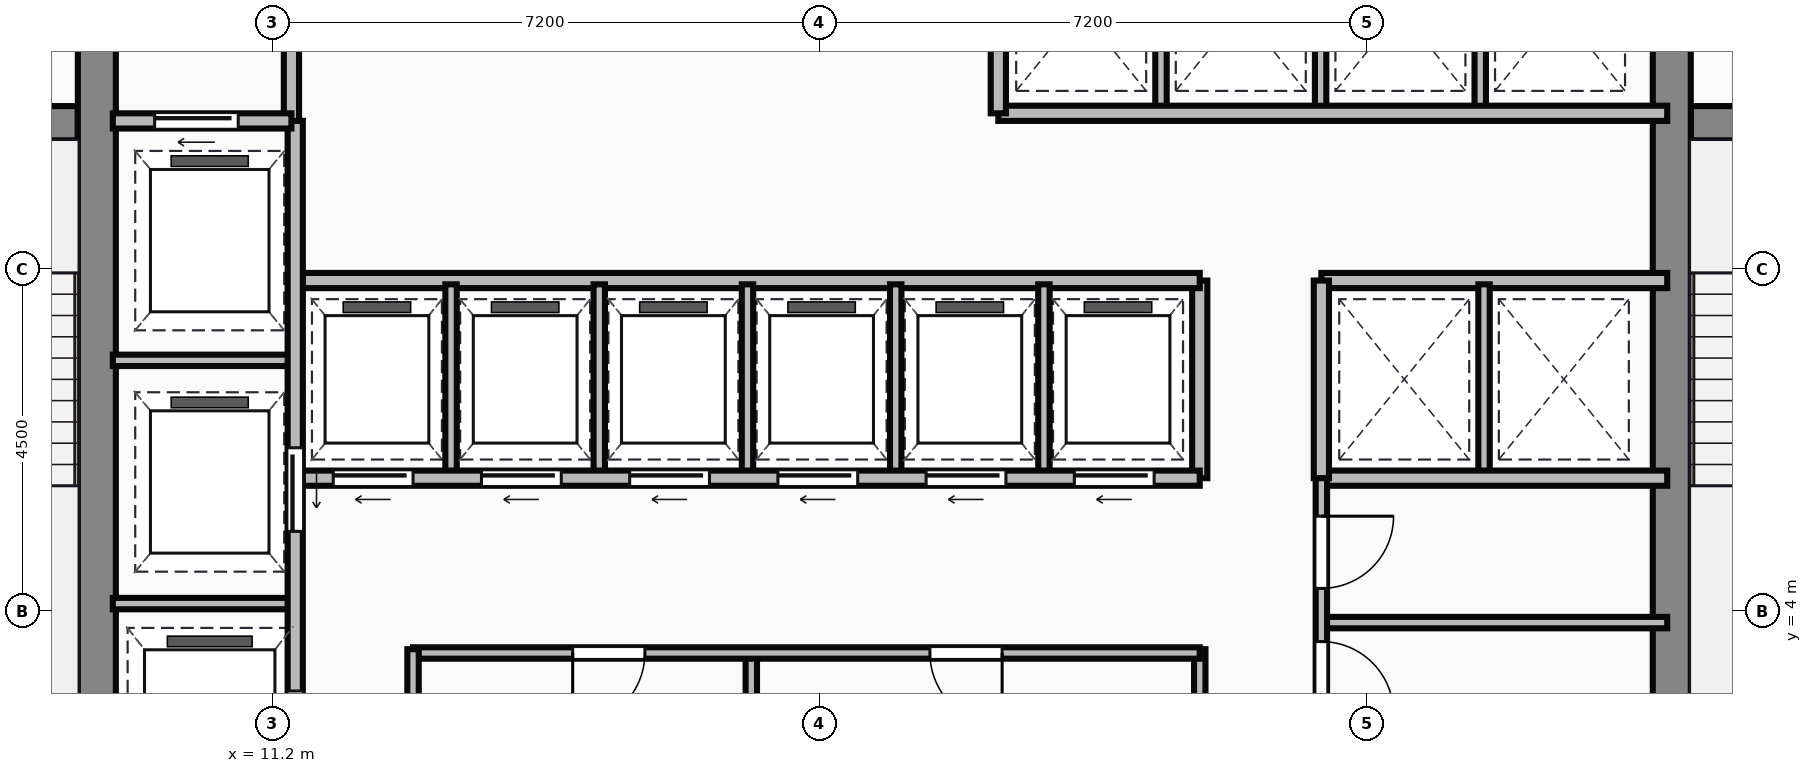
"""IFC4 building model, lengths in metres.
Left out: names, types, materials, properties, quantities, classifications, styles, units other than length and angle.
Written with IfcOpenShell. Run it as: python <this file> out.ifc"""

import sys

from ifc_helpers import new_model, si_unit, direction, frame, frame_2d, origin, place, context, subcontext, project, spatial, rectangle, extrude, source, transform, mapped, element, fill, save


model = new_model("IFC4")
c1 = context("Model", 3, precision=1e-05, world=origin(), true_north=direction((0.0, 1.0)))
c2 = subcontext(c1, "Body", "Model", "MODEL_VIEW")
j1 = project(units=[si_unit("LENGTHUNIT", "METRE"), si_unit("PLANEANGLEUNIT", "RADIAN")], contexts=[c1])
p1 = place(None, origin())
s1 = spatial("IfcSite", under=j1, at=p1, CompositionType="ELEMENT")
p2 = place(p1, origin())
s2 = spatial("IfcBuilding", under=s1, at=p2, CompositionType="ELEMENT")
p3 = place(p2, frame((0.0, 0.0, 144.25)))
s3 = spatial("IfcBuildingStorey", under=s2, at=p3, CompositionType="ELEMENT", Elevation=144.25)
m1 = source(origin(), c2, "Body", "SweptSolid", [
    extrude(rectangle(XDim=12.35, YDim=0.5, at=frame_2d((6.175, 0.0))), origin(), (0.0, 0.0, 1.0), 3.65),
])
for number, where, z_axis, x_axis in (
    (1, (8.89, 0.9, 0.0), (0.0, 0.0, 1.0), (0.0, 1.0, 0.0)),
    (2, (29.61, 0.9, 0.0), (0.0, 0.0, 1.0), (0.0, 1.0, 0.0)),
):
    element("IfcWall", number, at=place(p3, frame(where, z_axis=z_axis, x_axis=x_axis)), inside=s3, PredefinedType="SHEAR", context=c2, shape_type="MappedRepresentation", body=[
        mapped(m1, transform((0.0, 0.0, 0.0))),
    ])
m2 = source(origin(), c2, "Body", "SweptSolid", [
    extrude(rectangle(XDim=3.39, YDim=0.45, at=frame_2d((1.695, 0.0))), origin(), (0.0, 0.0, 1.0), 3.65),
])
p4 = place(p3, frame((5.25, 10.42, 0.0), z_axis=(0.0, 0.0, 1.0), x_axis=(1.0, 0.0, 0.0)))
e3 = element("IfcWall", 3, at=p4, inside=s3, PredefinedType="SHEAR", context=c2, shape_type="MappedRepresentation", body=[
    mapped(m2, transform((0.0, 0.0, 0.0))),
])
p5 = place(p4, frame((1.05, 0.0, 0.0)))
e4 = element("IfcOpeningElement", 4, at=p5, cuts=e3, PredefinedType="OPENING", context=c2, shape_type="SweptSolid", body=[
    extrude(rectangle(XDim=1.1, YDim=2.15, at=frame_2d((0.55, 1.075))), frame((0.0, 0.235, 0.0), z_axis=(0.0, -1.0, 0.0), x_axis=(1.0, 0.0, 0.0)), (0.0, 0.0, 1.0), 0.47),
])
p6 = place(p3, frame((29.86, 10.42, 0.0), z_axis=(0.0, 0.0, 1.0), x_axis=(1.0, 0.0, 0.0)))
e5 = element("IfcWall", 5, at=p6, inside=s3, PredefinedType="SHEAR", context=c2, shape_type="MappedRepresentation", body=[
    mapped(m2, transform((0.0, 0.0, 0.0))),
])
p7 = place(p6, frame((1.1, 0.0, 0.0)))
e6 = element("IfcOpeningElement", 6, at=p7, cuts=e5, PredefinedType="OPENING", context=c2, shape_type="SweptSolid", body=[
    extrude(rectangle(XDim=1.1, YDim=2.15, at=frame_2d((0.55, 1.075))), frame((0.0, 0.235, 0.0), z_axis=(0.0, -1.0, 0.0), x_axis=(1.0, 0.0, 0.0)), (0.0, 0.0, 1.0), 0.47),
])
m3 = source(origin(), c2, "Body", "SweptSolid", [
    extrude(rectangle(XDim=3.18, YDim=0.2, at=frame_2d((1.59, 0.0))), origin(), (0.0, 0.0, 1.0), 3.4),
])
p8 = place(p3, frame((11.45, 10.42, 0.0), z_axis=(0.0, 0.0, 1.0), x_axis=(0.0, 1.0, 0.0)))
e7 = element("IfcWall", 7, at=p8, inside=s3, PredefinedType="PARTITIONING", context=c2, shape_type="MappedRepresentation", body=[
    mapped(m3, transform((0.0, 0.0, 0.0))),
])
m4 = source(origin(), c2, "Body", "SweptSolid", [
    extrude(rectangle(XDim=2.35, YDim=0.2, at=frame_2d((1.175, 0.0))), origin(), (0.0, 0.0, 1.0), 3.4),
])
p9 = place(p3, frame((9.1, 10.45, 0.0), z_axis=(0.0, 0.0, 1.0), x_axis=(1.0, 0.0, 0.0)))
e8 = element("IfcWall", 8, at=p9, inside=s3, PredefinedType="PARTITIONING", context=c2, shape_type="MappedRepresentation", body=[
    mapped(m4, transform((0.0, 0.0, 0.0))),
])
p10 = place(p9, frame((0.55, 0.0, 0.0)))
e9 = element("IfcOpeningElement", 9, at=p10, cuts=e8, PredefinedType="OPENING", context=c2, shape_type="SweptSolid", body=[
    extrude(rectangle(XDim=1.1, YDim=2.15, at=frame_2d((0.55, 1.075))), frame((0.0, 0.11, 0.0), z_axis=(0.0, -1.0, 0.0), x_axis=(1.0, 0.0, 0.0)), (0.0, 0.0, 1.0), 0.22),
])
m5 = source(origin(), c2, "Body", "SweptSolid", [
    extrude(rectangle(XDim=9.6, YDim=0.2, at=frame_2d((4.8, 0.0))), origin(), (0.0, 0.0, 1.0), 3.4),
])
p11 = place(p3, frame((11.5, 0.85, 0.0), z_axis=(0.0, 0.0, 1.0), x_axis=(0.0, 1.0, 0.0)))
e10 = element("IfcWall", 10, at=p11, inside=s3, PredefinedType="PARTITIONING", context=c2, shape_type="MappedRepresentation", body=[
    mapped(m5, transform((0.0, 0.0, 0.0))),
])
p12 = place(p11, frame((4.2, 0.0, 0.0)))
e11 = element("IfcOpeningElement", 11, at=p12, cuts=e10, PredefinedType="OPENING", context=c2, shape_type="SweptSolid", body=[
    extrude(rectangle(XDim=1.1, YDim=2.15, at=frame_2d((0.55, 1.075))), frame((0.0, 0.11, 0.0), z_axis=(0.0, -1.0, 0.0), x_axis=(1.0, 0.0, 0.0)), (0.0, 0.0, 1.0), 0.22),
])
p13 = place(p11, frame((0.9, 0.0, 0.0)))
e12 = element("IfcOpeningElement", 12, at=p13, cuts=e10, PredefinedType="OPENING", context=c2, shape_type="SweptSolid", body=[
    extrude(rectangle(XDim=1.2, YDim=2.15, at=frame_2d((0.6, 1.075))), frame((0.0, 0.11, 0.0), z_axis=(0.0, -1.0, 0.0), x_axis=(1.0, 0.0, 0.0)), (0.0, 0.0, 1.0), 0.22),
])
m6 = source(origin(), c2, "Body", "SweptSolid", [
    extrude(rectangle(XDim=2.4, YDim=0.15, at=frame_2d((1.2, 0.0))), origin(), (0.0, 0.0, 1.0), 3.4),
])
for number, where, z_axis, x_axis in (
    (13, (9.1, 4.1, 0.0), (0.0, 0.0, 1.0), (1.0, 0.0, 0.0)),
    (14, (9.1, 7.3, 0.0), (0.0, 0.0, 1.0), (1.0, 0.0, 0.0)),
):
    element("IfcWall", number, at=place(p3, frame(where, z_axis=z_axis, x_axis=x_axis)), inside=s3, PredefinedType="PARTITIONING", context=c2, shape_type="MappedRepresentation", body=[
        mapped(m6, transform((0.0, 0.0, 0.0))),
    ])
m7 = source(origin(), c2, "Body", "SweptSolid", [
    extrude(rectangle(XDim=2.65, YDim=0.15, at=frame_2d((1.325, 0.0))), origin(), (0.0, 0.0, 1.0), 3.4),
])
p14 = place(p3, frame((13.05, 0.85, 0.0), z_axis=(0.0, 0.0, 1.0), x_axis=(0.0, 1.0, 0.0)))
e15 = element("IfcWall", 15, at=p14, inside=s3, PredefinedType="PARTITIONING", context=c2, shape_type="MappedRepresentation", body=[
    mapped(m7, transform((0.0, 0.0, 0.0))),
])
m8 = source(origin(), c2, "Body", "SweptSolid", [
    extrude(rectangle(XDim=10.35, YDim=0.15, at=frame_2d((5.175, 0.0))), origin(), (0.0, 0.0, 1.0), 3.4),
])
p15 = place(p3, frame((13.05, 3.45, 0.0), z_axis=(0.0, 0.0, 1.0), x_axis=(1.0, 0.0, 0.0)))
e16 = element("IfcWall", 16, at=p15, inside=s3, PredefinedType="PARTITIONING", context=c2, shape_type="MappedRepresentation", body=[
    mapped(m8, transform((0.0, 0.0, 0.0))),
])
p16 = place(p15, frame((2.1, 0.0, 0.0)))
e17 = element("IfcOpeningElement", 17, at=p16, cuts=e16, PredefinedType="OPENING", context=c2, shape_type="SweptSolid", body=[
    extrude(rectangle(XDim=0.95, YDim=2.15, at=frame_2d((0.475, 1.075))), frame((0.0, 0.085, 0.0), z_axis=(0.0, -1.0, 0.0), x_axis=(1.0, 0.0, 0.0)), (0.0, 0.0, 1.0), 0.17),
])
p17 = place(p15, frame((6.8, 0.0, 0.0)))
e18 = element("IfcOpeningElement", 18, at=p17, cuts=e16, PredefinedType="OPENING", context=c2, shape_type="SweptSolid", body=[
    extrude(rectangle(XDim=0.95, YDim=2.15, at=frame_2d((0.475, 1.075))), frame((0.0, 0.085, 0.0), z_axis=(0.0, -1.0, 0.0), x_axis=(1.0, 0.0, 0.0)), (0.0, 0.0, 1.0), 0.17),
])
p18 = place(p3, frame((23.4, 0.85, 0.0), z_axis=(0.0, 0.0, 1.0), x_axis=(0.0, 1.0, 0.0)))
e19 = element("IfcWall", 19, at=p18, inside=s3, PredefinedType="PARTITIONING", context=c2, shape_type="MappedRepresentation", body=[
    mapped(m7, transform((0.0, 0.0, 0.0))),
])
m9 = source(origin(), c2, "Body", "SweptSolid", [
    extrude(rectangle(XDim=2.6, YDim=0.15, at=frame_2d((1.3, 0.0))), origin(), (0.0, 0.0, 1.0), 3.4),
])
p19 = place(p3, frame((17.5, 0.85, 0.0), z_axis=(0.0, 0.0, 1.0), x_axis=(0.0, 1.0, 0.0)))
e20 = element("IfcWall", 20, at=p19, inside=s3, PredefinedType="PARTITIONING", context=c2, shape_type="MappedRepresentation", body=[
    mapped(m9, transform((0.0, 0.0, 0.0))),
])
m10 = source(origin(), c2, "Body", "SweptSolid", [
    extrude(rectangle(XDim=11.85, YDim=0.2, at=frame_2d((5.925, 0.0))), origin(), (0.0, 0.0, 1.0), 3.4),
])
p20 = place(p3, frame((11.55, 5.75, 0.0), z_axis=(0.0, 0.0, 1.0), x_axis=(1.0, 0.0, 0.0)))
e21 = element("IfcWall", 21, at=p20, inside=s3, PredefinedType="PARTITIONING", context=c2, shape_type="MappedRepresentation", body=[
    mapped(m10, transform((0.0, 0.0, 0.0))),
])
p21 = place(p20, frame((0.45, 0.0, 0.0)))
e22 = element("IfcOpeningElement", 22, at=p21, cuts=e21, PredefinedType="OPENING", context=c2, shape_type="SweptSolid", body=[
    extrude(rectangle(XDim=1.05, YDim=2.15, at=frame_2d((0.525, 1.075))), frame((0.0, 0.11, 0.0), z_axis=(0.0, -1.0, 0.0), x_axis=(1.0, 0.0, 0.0)), (0.0, 0.0, 1.0), 0.22),
])
p22 = place(p20, frame((2.4, 0.0, 0.0)))
e23 = element("IfcOpeningElement", 23, at=p22, cuts=e21, PredefinedType="OPENING", context=c2, shape_type="SweptSolid", body=[
    extrude(rectangle(XDim=1.05, YDim=2.15, at=frame_2d((0.525, 1.075))), frame((0.0, 0.11, 0.0), z_axis=(0.0, -1.0, 0.0), x_axis=(1.0, 0.0, 0.0)), (0.0, 0.0, 1.0), 0.22),
])
p23 = place(p20, frame((4.35, 0.0, 0.0)))
e24 = element("IfcOpeningElement", 24, at=p23, cuts=e21, PredefinedType="OPENING", context=c2, shape_type="SweptSolid", body=[
    extrude(rectangle(XDim=1.05, YDim=2.15, at=frame_2d((0.525, 1.075))), frame((0.0, 0.11, 0.0), z_axis=(0.0, -1.0, 0.0), x_axis=(1.0, 0.0, 0.0)), (0.0, 0.0, 1.0), 0.22),
])
p24 = place(p20, frame((6.3, 0.0, 0.0)))
e25 = element("IfcOpeningElement", 25, at=p24, cuts=e21, PredefinedType="OPENING", context=c2, shape_type="SweptSolid", body=[
    extrude(rectangle(XDim=1.05, YDim=2.15, at=frame_2d((0.525, 1.075))), frame((0.0, 0.11, 0.0), z_axis=(0.0, -1.0, 0.0), x_axis=(1.0, 0.0, 0.0)), (0.0, 0.0, 1.0), 0.22),
])
p25 = place(p20, frame((8.25, 0.0, 0.0)))
e26 = element("IfcOpeningElement", 26, at=p25, cuts=e21, PredefinedType="OPENING", context=c2, shape_type="SweptSolid", body=[
    extrude(rectangle(XDim=1.05, YDim=2.15, at=frame_2d((0.525, 1.075))), frame((0.0, 0.11, 0.0), z_axis=(0.0, -1.0, 0.0), x_axis=(1.0, 0.0, 0.0)), (0.0, 0.0, 1.0), 0.22),
])
p26 = place(p20, frame((10.2, 0.0, 0.0)))
e27 = element("IfcOpeningElement", 27, at=p26, cuts=e21, PredefinedType="OPENING", context=c2, shape_type="SweptSolid", body=[
    extrude(rectangle(XDim=1.05, YDim=2.15, at=frame_2d((0.525, 1.075))), frame((0.0, 0.11, 0.0), z_axis=(0.0, -1.0, 0.0), x_axis=(1.0, 0.0, 0.0)), (0.0, 0.0, 1.0), 0.22),
])
p27 = place(p3, frame((11.55, 8.35, 0.0), z_axis=(0.0, 0.0, 1.0), x_axis=(1.0, 0.0, 0.0)))
e28 = element("IfcWall", 28, at=p27, inside=s3, PredefinedType="PARTITIONING", context=c2, shape_type="MappedRepresentation", body=[
    mapped(m10, transform((0.0, 0.0, 0.0))),
])
m11 = source(origin(), c2, "Body", "SweptSolid", [
    extrude(rectangle(XDim=2.6, YDim=0.2, at=frame_2d((1.3, 0.0))), origin(), (0.0, 0.0, 1.0), 3.4),
])
p28 = place(p3, frame((23.4, 5.75, 0.0), z_axis=(0.0, 0.0, 1.0), x_axis=(0.0, 1.0, 0.0)))
e29 = element("IfcWall", 29, at=p28, inside=s3, PredefinedType="PARTITIONING", context=c2, shape_type="MappedRepresentation", body=[
    mapped(m11, transform((0.0, 0.0, 0.0))),
])
m12 = source(origin(), c2, "Body", "SweptSolid", [
    extrude(rectangle(XDim=2.5, YDim=0.15, at=frame_2d((1.25, 0.0))), origin(), (0.0, 0.0, 1.0), 3.4),
])
for number, where, z_axis, x_axis in (
    (30, (13.55, 5.8, 0.0), (0.0, 0.0, 1.0), (0.0, 1.0, 0.0)),
    (31, (15.5, 5.8, 0.0), (0.0, 0.0, 1.0), (0.0, 1.0, 0.0)),
    (32, (17.45, 5.8, 0.0), (0.0, 0.0, 1.0), (0.0, 1.0, 0.0)),
    (33, (19.4, 5.8, 0.0), (0.0, 0.0, 1.0), (0.0, 1.0, 0.0)),
    (34, (21.35, 5.8, 0.0), (0.0, 0.0, 1.0), (0.0, 1.0, 0.0)),
):
    element("IfcWall", number, at=place(p3, frame(where, z_axis=z_axis, x_axis=x_axis)), inside=s3, PredefinedType="PARTITIONING", context=c2, shape_type="MappedRepresentation", body=[
        mapped(m12, transform((0.0, 0.0, 0.0))),
    ])
m13 = source(origin(), c2, "Body", "SweptSolid", [
    extrude(rectangle(XDim=8.8, YDim=0.2, at=frame_2d((4.4, 0.0))), origin(), (0.0, 0.0, 1.0), 3.4),
])
p29 = place(p3, frame((20.75, 10.55, 0.0), z_axis=(0.0, 0.0, 1.0), x_axis=(1.0, 0.0, 0.0)))
e35 = element("IfcWall", 35, at=p29, inside=s3, PredefinedType="PARTITIONING", context=c2, shape_type="MappedRepresentation", body=[
    mapped(m13, transform((0.0, 0.0, 0.0))),
])
m14 = source(origin(), c2, "Body", "SweptSolid", [
    extrude(rectangle(XDim=3.0, YDim=0.2, at=frame_2d((1.5, 0.0))), origin(), (0.0, 0.0, 1.0), 3.4),
])
p30 = place(p3, frame((20.75, 10.55, 0.0), z_axis=(0.0, 0.0, 1.0), x_axis=(0.0, 1.0, 0.0)))
e36 = element("IfcWall", 36, at=p30, inside=s3, PredefinedType="PARTITIONING", context=c2, shape_type="MappedRepresentation", body=[
    mapped(m14, transform((0.0, 0.0, 0.0))),
])
m15 = source(origin(), c2, "Body", "SweptSolid", [
    extrude(rectangle(XDim=2.85, YDim=0.15, at=frame_2d((1.425, 0.0))), origin(), (0.0, 0.0, 1.0), 3.4),
])
for number, where, z_axis, x_axis in (
    (37, (22.89, 10.6, 0.0), (0.0, 0.0, 1.0), (0.0, 1.0, 0.0)),
    (38, (24.99, 10.6, 0.0), (0.0, 0.0, 1.0), (0.0, 1.0, 0.0)),
    (39, (27.09, 10.6, 0.0), (0.0, 0.0, 1.0), (0.0, 1.0, 0.0)),
):
    element("IfcWall", number, at=place(p3, frame(where, z_axis=z_axis, x_axis=x_axis)), inside=s3, PredefinedType="PARTITIONING", context=c2, shape_type="MappedRepresentation", body=[
        mapped(m15, transform((0.0, 0.0, 0.0))),
    ])
m16 = source(origin(), c2, "Body", "SweptSolid", [
    extrude(rectangle(XDim=4.55, YDim=0.2, at=frame_2d((2.275, 0.0))), origin(), (0.0, 0.0, 1.0), 3.4),
])
for number, where, z_axis, x_axis in (
    (40, (25.0, 8.35, 0.0), (0.0, 0.0, 1.0), (1.0, 0.0, 0.0)),
    (41, (25.0, 5.75, 0.0), (0.0, 0.0, 1.0), (1.0, 0.0, 0.0)),
):
    element("IfcWall", number, at=place(p3, frame(where, z_axis=z_axis, x_axis=x_axis)), inside=s3, PredefinedType="PARTITIONING", context=c2, shape_type="MappedRepresentation", body=[
        mapped(m16, transform((0.0, 0.0, 0.0))),
    ])
p31 = place(p3, frame((25.0, 5.75, 0.0), z_axis=(0.0, 0.0, 1.0), x_axis=(0.0, 1.0, 0.0)))
e42 = element("IfcWall", 42, at=p31, inside=s3, PredefinedType="PARTITIONING", context=c2, shape_type="MappedRepresentation", body=[
    mapped(m11, transform((0.0, 0.0, 0.0))),
])
p32 = place(p3, frame((27.14, 5.8, 0.0), z_axis=(0.0, 0.0, 1.0), x_axis=(0.0, 1.0, 0.0)))
e43 = element("IfcWall", 43, at=p32, inside=s3, PredefinedType="PARTITIONING", context=c2, shape_type="MappedRepresentation", body=[
    mapped(m12, transform((0.0, 0.0, 0.0))),
])
m17 = source(origin(), c2, "Body", "SweptSolid", [
    extrude(rectangle(XDim=4.9, YDim=0.15, at=frame_2d((2.45, 0.0))), origin(), (0.0, 0.0, 1.0), 3.4),
])
p33 = place(p3, frame((25.0, 0.85, 0.0), z_axis=(0.0, 0.0, 1.0), x_axis=(0.0, 1.0, 0.0)))
e44 = element("IfcWall", 44, at=p33, inside=s3, PredefinedType="PARTITIONING", context=c2, shape_type="MappedRepresentation", body=[
    mapped(m17, transform((0.0, 0.0, 0.0))),
])
p34 = place(p33, frame((1.8, 0.0, 0.0)))
e45 = element("IfcOpeningElement", 45, at=p34, cuts=e44, PredefinedType="OPENING", context=c2, shape_type="SweptSolid", body=[
    extrude(rectangle(XDim=0.95, YDim=2.15, at=frame_2d((0.475, 1.075))), frame((0.0, 0.085, 0.0), z_axis=(0.0, -1.0, 0.0), x_axis=(1.0, 0.0, 0.0)), (0.0, 0.0, 1.0), 0.17),
])
p35 = place(p33, frame((3.45, 0.0, 0.0)))
e46 = element("IfcOpeningElement", 46, at=p35, cuts=e44, PredefinedType="OPENING", context=c2, shape_type="SweptSolid", body=[
    extrude(rectangle(XDim=0.95, YDim=2.15, at=frame_2d((0.475, 1.075))), frame((0.0, 0.085, 0.0), z_axis=(0.0, -1.0, 0.0), x_axis=(1.0, 0.0, 0.0)), (0.0, 0.0, 1.0), 0.17),
])
m18 = source(origin(), c2, "Body", "SweptSolid", [
    extrude(rectangle(XDim=4.55, YDim=0.15, at=frame_2d((2.275, 0.0))), origin(), (0.0, 0.0, 1.0), 3.4),
])
p36 = place(p3, frame((25.0, 3.85, 0.0), z_axis=(0.0, 0.0, 1.0), x_axis=(1.0, 0.0, 0.0)))
e47 = element("IfcWall", 47, at=p36, inside=s3, PredefinedType="PARTITIONING", context=c2, shape_type="MappedRepresentation", body=[
    mapped(m18, transform((0.0, 0.0, 0.0))),
])
m19 = source(origin(), c2, "Body", "SweptSolid", [
    extrude(rectangle(XDim=1.1, YDim=2.15, at=frame_2d((0.55, 1.075))), frame((0.0, 0.025, 0.0), z_axis=(0.0, -1.0, 0.0), x_axis=(1.0, 0.0, 0.0)), (0.0, 0.0, 1.0), 0.05),
])
p37 = place(p10, origin())
e48 = element("IfcDoor", 48, at=p37, inside=s3, OperationType="SLIDING_TO_LEFT", PredefinedType="DOOR", context=c2, shape_type="MappedRepresentation", body=[
    mapped(m19, transform((0.0, 0.0, 0.0))),
])
fill(e9, e48)
p38 = place(p12, frame((1.1, 0.0, 0.0), z_axis=(0.0, 0.0, 1.0), x_axis=(-1.0, 0.0, 0.0)))
e49 = element("IfcDoor", 49, at=p38, inside=s3, OperationType="SLIDING_TO_LEFT", PredefinedType="DOOR", context=c2, shape_type="MappedRepresentation", body=[
    mapped(m19, transform((0.0, 0.0, 0.0))),
])
fill(e11, e49)
m20 = source(origin(), c2, "Body", "SweptSolid", [
    extrude(rectangle(XDim=1.2, YDim=2.15, at=frame_2d((0.6, 1.075))), frame((0.0, 0.025, 0.0), z_axis=(0.0, -1.0, 0.0), x_axis=(1.0, 0.0, 0.0)), (0.0, 0.0, 1.0), 0.05),
])
p39 = place(p13, frame((1.2, 0.0, 0.0), z_axis=(0.0, 0.0, 1.0), x_axis=(-1.0, 0.0, 0.0)))
e50 = element("IfcDoor", 50, at=p39, inside=s3, OperationType="SLIDING_TO_LEFT", PredefinedType="DOOR", context=c2, shape_type="MappedRepresentation", body=[
    mapped(m20, transform((0.0, 0.0, 0.0))),
])
fill(e12, e50)
m21 = source(origin(), c2, "Body", "SweptSolid", [
    extrude(rectangle(XDim=0.95, YDim=2.15, at=frame_2d((0.475, 1.075))), frame((0.0, 0.025, 0.0), z_axis=(0.0, -1.0, 0.0), x_axis=(1.0, 0.0, 0.0)), (0.0, 0.0, 1.0), 0.05),
])
p40 = place(p16, origin())
e51 = element("IfcDoor", 51, at=p40, inside=s3, OperationType="SINGLE_SWING_LEFT", PredefinedType="DOOR", context=c2, shape_type="MappedRepresentation", body=[
    mapped(m21, transform((0.0, 0.0, 0.0))),
])
fill(e17, e51)
p41 = place(p17, origin())
e52 = element("IfcDoor", 52, at=p41, inside=s3, OperationType="SINGLE_SWING_RIGHT", PredefinedType="DOOR", context=c2, shape_type="MappedRepresentation", body=[
    mapped(m21, transform((0.0, 0.0, 0.0))),
])
fill(e18, e52)
m22 = source(origin(), c2, "Body", "SweptSolid", [
    extrude(rectangle(XDim=1.05, YDim=2.15, at=frame_2d((0.525, 1.075))), frame((0.0, 0.025, 0.0), z_axis=(0.0, -1.0, 0.0), x_axis=(1.0, 0.0, 0.0)), (0.0, 0.0, 1.0), 0.05),
])
p42 = place(p21, frame((1.05, 0.0, 0.0), z_axis=(0.0, 0.0, 1.0), x_axis=(-1.0, 0.0, 0.0)))
e53 = element("IfcDoor", 53, at=p42, inside=s3, OperationType="SLIDING_TO_LEFT", PredefinedType="DOOR", context=c2, shape_type="MappedRepresentation", body=[
    mapped(m22, transform((0.0, 0.0, 0.0))),
])
fill(e22, e53)
p43 = place(p22, frame((1.05, 0.0, 0.0), z_axis=(0.0, 0.0, 1.0), x_axis=(-1.0, 0.0, 0.0)))
e54 = element("IfcDoor", 54, at=p43, inside=s3, OperationType="SLIDING_TO_LEFT", PredefinedType="DOOR", context=c2, shape_type="MappedRepresentation", body=[
    mapped(m22, transform((0.0, 0.0, 0.0))),
])
fill(e23, e54)
p44 = place(p23, frame((1.05, 0.0, 0.0), z_axis=(0.0, 0.0, 1.0), x_axis=(-1.0, 0.0, 0.0)))
e55 = element("IfcDoor", 55, at=p44, inside=s3, OperationType="SLIDING_TO_LEFT", PredefinedType="DOOR", context=c2, shape_type="MappedRepresentation", body=[
    mapped(m22, transform((0.0, 0.0, 0.0))),
])
fill(e24, e55)
p45 = place(p24, frame((1.05, 0.0, 0.0), z_axis=(0.0, 0.0, 1.0), x_axis=(-1.0, 0.0, 0.0)))
e56 = element("IfcDoor", 56, at=p45, inside=s3, OperationType="SLIDING_TO_LEFT", PredefinedType="DOOR", context=c2, shape_type="MappedRepresentation", body=[
    mapped(m22, transform((0.0, 0.0, 0.0))),
])
fill(e25, e56)
p46 = place(p25, frame((1.05, 0.0, 0.0), z_axis=(0.0, 0.0, 1.0), x_axis=(-1.0, 0.0, 0.0)))
e57 = element("IfcDoor", 57, at=p46, inside=s3, OperationType="SLIDING_TO_LEFT", PredefinedType="DOOR", context=c2, shape_type="MappedRepresentation", body=[
    mapped(m22, transform((0.0, 0.0, 0.0))),
])
fill(e26, e57)
p47 = place(p26, frame((1.05, 0.0, 0.0), z_axis=(0.0, 0.0, 1.0), x_axis=(-1.0, 0.0, 0.0)))
e58 = element("IfcDoor", 58, at=p47, inside=s3, OperationType="SLIDING_TO_LEFT", PredefinedType="DOOR", context=c2, shape_type="MappedRepresentation", body=[
    mapped(m22, transform((0.0, 0.0, 0.0))),
])
fill(e27, e58)
p48 = place(p34, origin())
e59 = element("IfcDoor", 59, at=p48, inside=s3, OperationType="SINGLE_SWING_LEFT", PredefinedType="DOOR", context=c2, shape_type="MappedRepresentation", body=[
    mapped(m21, transform((0.0, 0.0, 0.0))),
])
fill(e45, e59)
p49 = place(p35, origin())
e60 = element("IfcDoor", 60, at=p49, inside=s3, OperationType="SINGLE_SWING_RIGHT", PredefinedType="DOOR", context=c2, shape_type="MappedRepresentation", body=[
    mapped(m21, transform((0.0, 0.0, 0.0))),
])
fill(e46, e60)
save(model, sys.argv[1])
